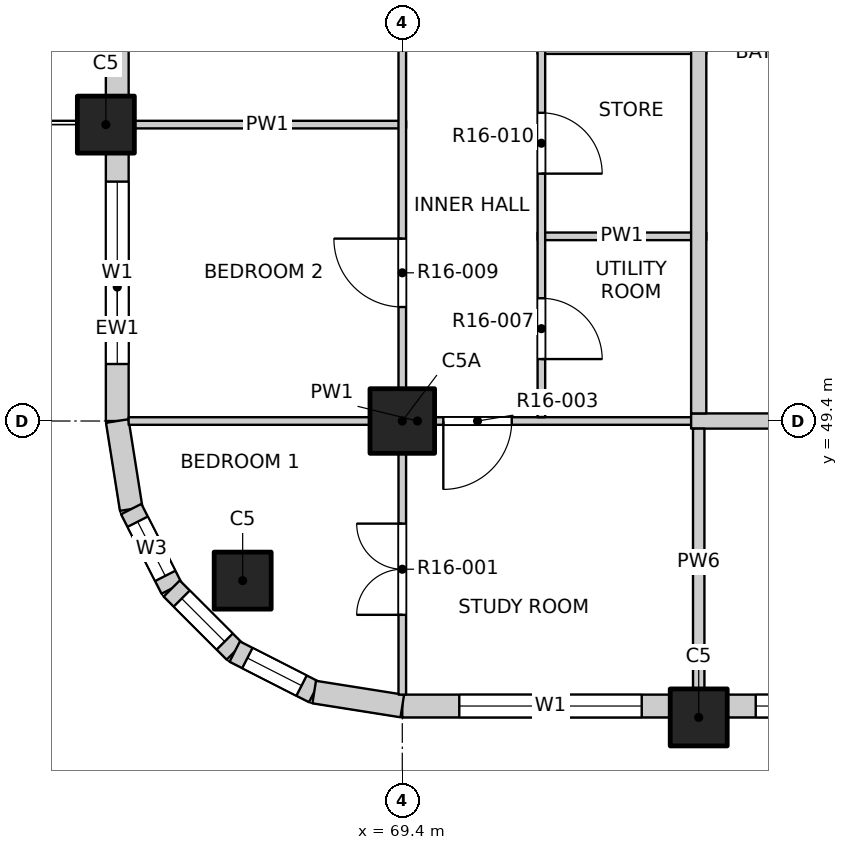
"""IFC4 building model, lengths in metres.
Left out: names, types, materials, properties, quantities, classifications, styles, units other than length and angle.
Written with IfcOpenShell. Run it as: python <this file> out.ifc"""

import sys

from ifc_helpers import new_model, si_unit, direction, frame, frame_2d, origin, origin_2d, place, context, subcontext, project, spatial, rectangle, extrude, element, fill, save


model = new_model("IFC4")
c1 = context("Model", 3, precision=1e-05, world=origin(), true_north=direction((0.0, 1.0)))
c2 = subcontext(c1, "Body", "Model", "MODEL_VIEW")
j1 = project(units=[si_unit("LENGTHUNIT", "METRE"), si_unit("PLANEANGLEUNIT", "RADIAN")], contexts=[c1])
p1 = place(None, origin())
s1 = spatial("IfcSite", under=j1, at=p1, CompositionType="ELEMENT")
p2 = place(p1, origin())
s2 = spatial("IfcBuilding", under=s1, at=p2, CompositionType="ELEMENT")
p3 = place(p2, frame((0.0, 0.0, 169.0)))
s3 = spatial("IfcBuildingStorey", under=s2, at=p3, CompositionType="ELEMENT", Elevation=169.0)
for number, where, z_axis, x_axis in (
    (1, (67.3, 47.3, -0.25), (0.0, 0.0, 1.0), (1.0, 0.0, 0.0)),
    (2, (65.5, 53.3, -0.25), (0.0, 0.0, 1.0), (1.0, 0.0, 0.0)),
    (3, (73.3, 45.5, -0.25), (0.0, 0.0, 1.0), (1.0, 0.0, 0.0)),
):
    element("IfcColumn", number, at=place(p3, frame(where, z_axis=z_axis, x_axis=x_axis)), inside=s3, PredefinedType="COLUMN", context=c2, shape_type="SweptSolid", body=[
        extrude(rectangle(XDim=0.75, YDim=0.75, at=origin_2d()), origin(), (0.0, 0.0, 1.0), 3.35),
    ])
p4 = place(p3, frame((69.4, 49.4, -0.25), z_axis=(0.0, 0.0, 1.0), x_axis=(1.0, 0.0, 0.0)))
e4 = element("IfcColumn", 4, at=p4, inside=s3, PredefinedType="COLUMN", context=c2, shape_type="SweptSolid", body=[
    extrude(rectangle(XDim=0.85, YDim=0.85, at=origin_2d()), origin(), (0.0, 0.0, 1.0), 3.35),
])
p5 = place(p3, frame((69.4, 45.65, 0.0), z_axis=(0.0, 0.0, 1.0), x_axis=(1.0, 0.0, 0.0)))
e5 = element("IfcWall", 5, at=p5, inside=s3, PredefinedType="SOLIDWALL", context=c2, shape_type="SweptSolid", body=[
    extrude(rectangle(XDim=3.525, YDim=0.3, at=frame_2d((1.763, 0.0))), origin(), (0.0, 0.0, 1.0), 3.1),
])
p6 = place(p5, frame((0.75, 0.0, 0.9)))
e6 = element("IfcOpeningElement", 6, at=p6, cuts=e5, PredefinedType="OPENING", context=c2, shape_type="SweptSolid", body=[
    extrude(rectangle(XDim=2.4, YDim=1.8, at=frame_2d((1.2, 0.9))), frame((0.0, 0.16, 0.0), z_axis=(0.0, -1.0, 0.0), x_axis=(1.0, 0.0, 0.0)), (0.0, 0.0, 1.0), 0.32),
])
p7 = place(p3, frame((73.675, 45.65, 0.0), z_axis=(0.0, 0.0, 1.0), x_axis=(1.0, 0.0, 0.0)))
e7 = element("IfcWall", 7, at=p7, inside=s3, PredefinedType="SOLIDWALL", context=c2, shape_type="SweptSolid", body=[
    extrude(rectangle(XDim=7.05, YDim=0.3, at=frame_2d((3.525, 0.0))), origin(), (0.0, 0.0, 1.0), 3.1),
])
p8 = place(p7, frame((0.375, 0.0, 0.9)))
e8 = element("IfcOpeningElement", 8, at=p8, cuts=e7, PredefinedType="OPENING", context=c2, shape_type="SweptSolid", body=[
    extrude(rectangle(XDim=2.4, YDim=1.8, at=frame_2d((1.2, 0.9))), frame((0.0, 0.16, 0.0), z_axis=(0.0, -1.0, 0.0), x_axis=(1.0, 0.0, 0.0)), (0.0, 0.0, 1.0), 0.32),
])
p9 = place(p7, frame((4.275, 0.0, 0.9)))
e9 = element("IfcOpeningElement", 9, at=p9, cuts=e7, PredefinedType="OPENING", context=c2, shape_type="SweptSolid", body=[
    extrude(rectangle(XDim=2.4, YDim=1.8, at=frame_2d((1.2, 0.9))), frame((0.0, 0.16, 0.0), z_axis=(0.0, -1.0, 0.0), x_axis=(1.0, 0.0, 0.0)), (0.0, 0.0, 1.0), 0.32),
])
p10 = place(p3, frame((65.65, 49.4, 0.0), z_axis=(0.0, 0.0, 1.0), x_axis=(0.0, 1.0, 0.0)))
e10 = element("IfcWall", 10, at=p10, inside=s3, PredefinedType="SOLIDWALL", context=c2, shape_type="SweptSolid", body=[
    extrude(rectangle(XDim=3.525, YDim=0.3, at=frame_2d((1.763, 0.0))), origin(), (0.0, 0.0, 1.0), 3.1),
])
p11 = place(p10, frame((0.75, 0.0, 0.9)))
e11 = element("IfcOpeningElement", 11, at=p11, cuts=e10, PredefinedType="OPENING", context=c2, shape_type="SweptSolid", body=[
    extrude(rectangle(XDim=2.4, YDim=1.8, at=frame_2d((1.2, 0.9))), frame((0.0, 0.16, 0.0), z_axis=(0.0, -1.0, 0.0), x_axis=(1.0, 0.0, 0.0)), (0.0, 0.0, 1.0), 0.32),
])
p12 = place(p3, frame((65.65, 53.675, 0.0), z_axis=(0.0, 0.0, 1.0), x_axis=(0.0, 1.0, 0.0)))
e12 = element("IfcWall", 12, at=p12, inside=s3, PredefinedType="SOLIDWALL", context=c2, shape_type="SweptSolid", body=[
    extrude(rectangle(XDim=7.05, YDim=0.3, at=frame_2d((3.525, 0.0))), origin(), (0.0, 0.0, 1.0), 3.1),
])
p13 = place(p12, frame((0.675, 0.0, 0.0)))
e13 = element("IfcOpeningElement", 13, at=p13, cuts=e12, PredefinedType="OPENING", context=c2, shape_type="SweptSolid", body=[
    extrude(rectangle(XDim=1.8, YDim=2.4, at=frame_2d((0.9, 1.2))), frame((0.0, 0.16, 0.0), z_axis=(0.0, -1.0, 0.0), x_axis=(1.0, 0.0, 0.0)), (0.0, 0.0, 1.0), 0.32),
])
p14 = place(p12, frame((4.275, 0.0, 0.9)))
e14 = element("IfcOpeningElement", 14, at=p14, cuts=e12, PredefinedType="OPENING", context=c2, shape_type="SweptSolid", body=[
    extrude(rectangle(XDim=2.4, YDim=1.8, at=frame_2d((1.2, 0.9))), frame((0.0, 0.16, 0.0), z_axis=(0.0, -1.0, 0.0), x_axis=(1.0, 0.0, 0.0)), (0.0, 0.0, 1.0), 0.32),
])
p15 = place(p3, frame((65.65, 49.4, 0.0), z_axis=(0.0, 0.0, 1.0), x_axis=(0.156496880861, -0.987678452879, 0.0)))
e15 = element("IfcWall", 15, at=p15, inside=s3, PredefinedType="SOLIDWALL", context=c2, shape_type="SweptSolid", body=[
    extrude(rectangle(XDim=1.173, YDim=0.3, at=frame_2d((0.586, 0.0))), origin(), (0.0, 0.0, 1.0), 3.1),
])
p16 = place(p3, frame((65.833, 48.241, 0.0), z_axis=(0.0, 0.0, 1.0), x_axis=(0.454025524128, -0.890988677504, 0.0)))
e16 = element("IfcWall", 16, at=p16, inside=s3, PredefinedType="SOLIDWALL", context=c2, shape_type="SweptSolid", body=[
    extrude(rectangle(XDim=1.173, YDim=0.3, at=frame_2d((0.587, 0.0))), origin(), (0.0, 0.0, 1.0), 3.1),
])
p17 = place(p16, frame((0.187, 0.0, 0.9)))
e17 = element("IfcOpeningElement", 17, at=p17, cuts=e16, PredefinedType="OPENING", context=c2, shape_type="SweptSolid", body=[
    extrude(rectangle(XDim=0.8, YDim=1.2, at=frame_2d((0.4, 0.6))), frame((0.0, 0.16, 0.0), z_axis=(0.0, -1.0, 0.0), x_axis=(1.0, 0.0, 0.0)), (0.0, 0.0, 1.0), 0.32),
])
p18 = place(p3, frame((66.366, 47.196, 0.0), z_axis=(0.0, 0.0, 1.0), x_axis=(0.707106781187, -0.707106781187, 0.0)))
e18 = element("IfcWall", 18, at=p18, inside=s3, PredefinedType="SOLIDWALL", context=c2, shape_type="SweptSolid", body=[
    extrude(rectangle(XDim=1.173, YDim=0.3, at=frame_2d((0.586, 0.0))), origin(), (0.0, 0.0, 1.0), 3.1),
])
p19 = place(p18, frame((0.187, 0.0, 0.9)))
e19 = element("IfcOpeningElement", 19, at=p19, cuts=e18, PredefinedType="OPENING", context=c2, shape_type="SweptSolid", body=[
    extrude(rectangle(XDim=0.8, YDim=1.2, at=frame_2d((0.4, 0.6))), frame((0.0, 0.16, 0.0), z_axis=(0.0, -1.0, 0.0), x_axis=(1.0, 0.0, 0.0)), (0.0, 0.0, 1.0), 0.32),
])
p20 = place(p3, frame((67.196, 46.366, 0.0), z_axis=(0.0, 0.0, 1.0), x_axis=(0.890988677504, -0.454025524128, 0.0)))
e20 = element("IfcWall", 20, at=p20, inside=s3, PredefinedType="SOLIDWALL", context=c2, shape_type="SweptSolid", body=[
    extrude(rectangle(XDim=1.173, YDim=0.3, at=frame_2d((0.587, 0.0))), origin(), (0.0, 0.0, 1.0), 3.1),
])
p21 = place(p20, frame((0.187, 0.0, 0.9)))
e21 = element("IfcOpeningElement", 21, at=p21, cuts=e20, PredefinedType="OPENING", context=c2, shape_type="SweptSolid", body=[
    extrude(rectangle(XDim=0.8, YDim=1.2, at=frame_2d((0.4, 0.6))), frame((0.0, 0.16, 0.0), z_axis=(0.0, -1.0, 0.0), x_axis=(1.0, 0.0, 0.0)), (0.0, 0.0, 1.0), 0.32),
])
p22 = place(p3, frame((68.241, 45.833, 0.0), z_axis=(0.0, 0.0, 1.0), x_axis=(0.987678452879, -0.156496880861, 0.0)))
e22 = element("IfcWall", 22, at=p22, inside=s3, PredefinedType="SOLIDWALL", context=c2, shape_type="SweptSolid", body=[
    extrude(rectangle(XDim=1.173, YDim=0.3, at=frame_2d((0.586, 0.0))), origin(), (0.0, 0.0, 1.0), 3.1),
])
p23 = place(p3, frame((65.8, 49.4, 0.0), z_axis=(0.0, 0.0, 1.0), x_axis=(1.0, 0.0, 0.0)))
e23 = element("IfcWall", 23, at=p23, inside=s3, PredefinedType="PARTITIONING", context=c2, shape_type="SweptSolid", body=[
    extrude(rectangle(XDim=7.6, YDim=0.1, at=frame_2d((3.8, 0.0))), origin(), (0.0, 0.0, 1.0), 3.1),
])
p24 = place(p23, frame((4.14, 0.0, 0.0)))
e24 = element("IfcOpeningElement", 24, at=p24, cuts=e23, PredefinedType="OPENING", context=c2, shape_type="SweptSolid", body=[
    extrude(rectangle(XDim=0.9, YDim=2.1, at=frame_2d((0.45, 1.05))), frame((0.0, 0.06, 0.0), z_axis=(0.0, -1.0, 0.0), x_axis=(1.0, 0.0, 0.0)), (0.0, 0.0, 1.0), 0.12),
])
p25 = place(p3, frame((73.2, 49.4, 0.0), z_axis=(0.0, 0.0, 1.0), x_axis=(1.0, 0.0, 0.0)))
e25 = element("IfcWall", 25, at=p25, inside=s3, PredefinedType="PARTITIONING", context=c2, shape_type="SweptSolid", body=[
    extrude(rectangle(XDim=23.6, YDim=0.2, at=frame_2d((11.8, 0.0))), origin(), (0.0, 0.0, 1.0), 3.1),
])
p26 = place(p25, frame((7.3, 0.0, 0.0)))
e26 = element("IfcOpeningElement", 26, at=p26, cuts=e25, PredefinedType="OPENING", context=c2, shape_type="SweptSolid", body=[
    extrude(rectangle(XDim=1.2, YDim=2.1, at=frame_2d((0.6, 1.05))), frame((0.0, 0.11, 0.0), z_axis=(0.0, -1.0, 0.0), x_axis=(1.0, 0.0, 0.0)), (0.0, 0.0, 1.0), 0.22),
])
p27 = place(p25, frame((20.125, 0.0, 0.0)))
e27 = element("IfcOpeningElement", 27, at=p27, cuts=e25, PredefinedType="OPENING", context=c2, shape_type="SweptSolid", body=[
    extrude(rectangle(XDim=1.2, YDim=2.1, at=frame_2d((0.6, 1.05))), frame((0.0, 0.11, 0.0), z_axis=(0.0, -1.0, 0.0), x_axis=(1.0, 0.0, 0.0)), (0.0, 0.0, 1.0), 0.22),
])
p28 = place(p3, frame((71.18, 51.83, 0.0), z_axis=(0.0, 0.0, 1.0), x_axis=(1.0, 0.0, 0.0)))
e28 = element("IfcWall", 28, at=p28, inside=s3, PredefinedType="PARTITIONING", context=c2, shape_type="SweptSolid", body=[
    extrude(rectangle(XDim=2.22, YDim=0.1, at=frame_2d((1.11, 0.0))), origin(), (0.0, 0.0, 1.0), 3.1),
])
p29 = place(p3, frame((65.8, 53.3, 0.0), z_axis=(0.0, 0.0, 1.0), x_axis=(1.0, 0.0, 0.0)))
e29 = element("IfcWall", 29, at=p29, inside=s3, PredefinedType="PARTITIONING", context=c2, shape_type="SweptSolid", body=[
    extrude(rectangle(XDim=3.65, YDim=0.1, at=frame_2d((1.825, 0.0))), origin(), (0.0, 0.0, 1.0), 3.1),
])
p30 = place(p3, frame((71.18, 54.28, 0.0), z_axis=(0.0, 0.0, 1.0), x_axis=(1.0, 0.0, 0.0)))
e30 = element("IfcWall", 30, at=p30, inside=s3, PredefinedType="PARTITIONING", context=c2, shape_type="SweptSolid", body=[
    extrude(rectangle(XDim=2.22, YDim=0.1, at=frame_2d((1.11, 0.0))), origin(), (0.0, 0.0, 1.0), 3.1),
])
p31 = place(p3, frame((69.4, 45.8, 0.0), z_axis=(0.0, 0.0, 1.0), x_axis=(0.0, 1.0, 0.0)))
e31 = element("IfcWall", 31, at=p31, inside=s3, PredefinedType="PARTITIONING", context=c2, shape_type="SweptSolid", body=[
    extrude(rectangle(XDim=38.4, YDim=0.1, at=frame_2d((19.2, 0.0))), origin(), (0.0, 0.0, 1.0), 3.1),
])
p32 = place(p31, frame((1.05, 0.0, 0.0)))
e32 = element("IfcOpeningElement", 32, at=p32, cuts=e31, PredefinedType="OPENING", context=c2, shape_type="SweptSolid", body=[
    extrude(rectangle(XDim=1.2, YDim=2.1, at=frame_2d((0.6, 1.05))), frame((0.0, 0.06, 0.0), z_axis=(0.0, -1.0, 0.0), x_axis=(1.0, 0.0, 0.0)), (0.0, 0.0, 1.0), 0.12),
])
p33 = place(p31, frame((5.1, 0.0, 0.0)))
e33 = element("IfcOpeningElement", 33, at=p33, cuts=e31, PredefinedType="OPENING", context=c2, shape_type="SweptSolid", body=[
    extrude(rectangle(XDim=0.9, YDim=2.1, at=frame_2d((0.45, 1.05))), frame((0.0, 0.06, 0.0), z_axis=(0.0, -1.0, 0.0), x_axis=(1.0, 0.0, 0.0)), (0.0, 0.0, 1.0), 0.12),
])
p34 = place(p31, frame((9.0, 0.0, 0.0)))
e34 = element("IfcOpeningElement", 34, at=p34, cuts=e31, PredefinedType="OPENING", context=c2, shape_type="SweptSolid", body=[
    extrude(rectangle(XDim=0.9, YDim=2.1, at=frame_2d((0.45, 1.05))), frame((0.0, 0.06, 0.0), z_axis=(0.0, -1.0, 0.0), x_axis=(1.0, 0.0, 0.0)), (0.0, 0.0, 1.0), 0.12),
])
p35 = place(p31, frame((12.9, 0.0, 0.0)))
e35 = element("IfcOpeningElement", 35, at=p35, cuts=e31, PredefinedType="OPENING", context=c2, shape_type="SweptSolid", body=[
    extrude(rectangle(XDim=0.9, YDim=2.1, at=frame_2d((0.45, 1.05))), frame((0.0, 0.06, 0.0), z_axis=(0.0, -1.0, 0.0), x_axis=(1.0, 0.0, 0.0)), (0.0, 0.0, 1.0), 0.12),
])
p36 = place(p31, frame((16.8, 0.0, 0.0)))
e36 = element("IfcOpeningElement", 36, at=p36, cuts=e31, PredefinedType="OPENING", context=c2, shape_type="SweptSolid", body=[
    extrude(rectangle(XDim=0.9, YDim=2.1, at=frame_2d((0.45, 1.05))), frame((0.0, 0.06, 0.0), z_axis=(0.0, -1.0, 0.0), x_axis=(1.0, 0.0, 0.0)), (0.0, 0.0, 1.0), 0.12),
])
p37 = place(p31, frame((20.7, 0.0, 0.0)))
e37 = element("IfcOpeningElement", 37, at=p37, cuts=e31, PredefinedType="OPENING", context=c2, shape_type="SweptSolid", body=[
    extrude(rectangle(XDim=0.9, YDim=2.1, at=frame_2d((0.45, 1.05))), frame((0.0, 0.06, 0.0), z_axis=(0.0, -1.0, 0.0), x_axis=(1.0, 0.0, 0.0)), (0.0, 0.0, 1.0), 0.12),
])
p38 = place(p31, frame((24.6, 0.0, 0.0)))
e38 = element("IfcOpeningElement", 38, at=p38, cuts=e31, PredefinedType="OPENING", context=c2, shape_type="SweptSolid", body=[
    extrude(rectangle(XDim=0.9, YDim=2.1, at=frame_2d((0.45, 1.05))), frame((0.0, 0.06, 0.0), z_axis=(0.0, -1.0, 0.0), x_axis=(1.0, 0.0, 0.0)), (0.0, 0.0, 1.0), 0.12),
])
p39 = place(p31, frame((28.5, 0.0, 0.0)))
e39 = element("IfcOpeningElement", 39, at=p39, cuts=e31, PredefinedType="OPENING", context=c2, shape_type="SweptSolid", body=[
    extrude(rectangle(XDim=0.9, YDim=2.1, at=frame_2d((0.45, 1.05))), frame((0.0, 0.06, 0.0), z_axis=(0.0, -1.0, 0.0), x_axis=(1.0, 0.0, 0.0)), (0.0, 0.0, 1.0), 0.12),
])
p40 = place(p31, frame((32.4, 0.0, 0.0)))
e40 = element("IfcOpeningElement", 40, at=p40, cuts=e31, PredefinedType="OPENING", context=c2, shape_type="SweptSolid", body=[
    extrude(rectangle(XDim=0.9, YDim=2.1, at=frame_2d((0.45, 1.05))), frame((0.0, 0.06, 0.0), z_axis=(0.0, -1.0, 0.0), x_axis=(1.0, 0.0, 0.0)), (0.0, 0.0, 1.0), 0.12),
])
p41 = place(p31, frame((36.15, 0.0, 0.0)))
e41 = element("IfcOpeningElement", 41, at=p41, cuts=e31, PredefinedType="OPENING", context=c2, shape_type="SweptSolid", body=[
    extrude(rectangle(XDim=1.2, YDim=2.1, at=frame_2d((0.6, 1.05))), frame((0.0, 0.06, 0.0), z_axis=(0.0, -1.0, 0.0), x_axis=(1.0, 0.0, 0.0)), (0.0, 0.0, 1.0), 0.12),
])
p42 = place(p3, frame((71.23, 49.45, 0.0), z_axis=(0.0, 0.0, 1.0), x_axis=(0.0, 1.0, 0.0)))
e42 = element("IfcWall", 42, at=p42, inside=s3, PredefinedType="PARTITIONING", context=c2, shape_type="SweptSolid", body=[
    extrude(rectangle(XDim=13.0, YDim=0.1, at=frame_2d((6.5, 0.0))), origin(), (0.0, 0.0, 1.0), 3.1),
])
p43 = place(p42, frame((0.765, 0.0, 0.0)))
e43 = element("IfcOpeningElement", 43, at=p43, cuts=e42, PredefinedType="OPENING", context=c2, shape_type="SweptSolid", body=[
    extrude(rectangle(XDim=0.8, YDim=2.1, at=frame_2d((0.4, 1.05))), frame((0.0, 0.06, 0.0), z_axis=(0.0, -1.0, 0.0), x_axis=(1.0, 0.0, 0.0)), (0.0, 0.0, 1.0), 0.12),
])
p44 = place(p42, frame((3.205, 0.0, 0.0)))
e44 = element("IfcOpeningElement", 44, at=p44, cuts=e42, PredefinedType="OPENING", context=c2, shape_type="SweptSolid", body=[
    extrude(rectangle(XDim=0.8, YDim=2.1, at=frame_2d((0.4, 1.05))), frame((0.0, 0.06, 0.0), z_axis=(0.0, -1.0, 0.0), x_axis=(1.0, 0.0, 0.0)), (0.0, 0.0, 1.0), 0.12),
])
p45 = place(p42, frame((5.73, 0.0, 0.0)))
e45 = element("IfcOpeningElement", 45, at=p45, cuts=e42, PredefinedType="OPENING", context=c2, shape_type="SweptSolid", body=[
    extrude(rectangle(XDim=0.8, YDim=2.1, at=frame_2d((0.4, 1.05))), frame((0.0, 0.06, 0.0), z_axis=(0.0, -1.0, 0.0), x_axis=(1.0, 0.0, 0.0)), (0.0, 0.0, 1.0), 0.12),
])
p46 = place(p42, frame((8.18, 0.0, 0.0)))
e46 = element("IfcOpeningElement", 46, at=p46, cuts=e42, PredefinedType="OPENING", context=c2, shape_type="SweptSolid", body=[
    extrude(rectangle(XDim=0.9, YDim=2.1, at=frame_2d((0.45, 1.05))), frame((0.0, 0.06, 0.0), z_axis=(0.0, -1.0, 0.0), x_axis=(1.0, 0.0, 0.0)), (0.0, 0.0, 1.0), 0.12),
])
p47 = place(p42, frame((10.99, 0.0, 0.0)))
e47 = element("IfcOpeningElement", 47, at=p47, cuts=e42, PredefinedType="OPENING", context=c2, shape_type="SweptSolid", body=[
    extrude(rectangle(XDim=0.9, YDim=2.1, at=frame_2d((0.45, 1.05))), frame((0.0, 0.06, 0.0), z_axis=(0.0, -1.0, 0.0), x_axis=(1.0, 0.0, 0.0)), (0.0, 0.0, 1.0), 0.12),
])
p48 = place(p3, frame((73.3, 45.8, 0.0), z_axis=(0.0, 0.0, 1.0), x_axis=(0.0, 1.0, 0.0)))
e48 = element("IfcWall", 48, at=p48, inside=s3, PredefinedType="PARTITIONING", context=c2, shape_type="SweptSolid", body=[
    extrude(rectangle(XDim=3.5, YDim=0.15, at=frame_2d((1.75, 0.0))), origin(), (0.0, 0.0, 1.0), 3.1),
])
p49 = place(p3, frame((73.3, 49.5, 0.0), z_axis=(0.0, 0.0, 1.0), x_axis=(0.0, 1.0, 0.0)))
e49 = element("IfcWall", 49, at=p49, inside=s3, PredefinedType="PARTITIONING", context=c2, shape_type="SweptSolid", body=[
    extrude(rectangle(XDim=34.7, YDim=0.2, at=frame_2d((17.35, 0.0))), origin(), (0.0, 0.0, 1.0), 3.1),
])
p50 = place(p49, frame((14.275, 0.0, 0.0)))
e50 = element("IfcOpeningElement", 50, at=p50, cuts=e49, PredefinedType="OPENING", context=c2, shape_type="SweptSolid", body=[
    extrude(rectangle(XDim=1.0, YDim=2.1, at=frame_2d((0.5, 1.05))), frame((0.0, 0.11, 0.0), z_axis=(0.0, -1.0, 0.0), x_axis=(1.0, 0.0, 0.0)), (0.0, 0.0, 1.0), 0.22),
])
p51 = place(p49, frame((21.925, 0.0, 0.0)))
e51 = element("IfcOpeningElement", 51, at=p51, cuts=e49, PredefinedType="OPENING", context=c2, shape_type="SweptSolid", body=[
    extrude(rectangle(XDim=1.0, YDim=2.1, at=frame_2d((0.5, 1.05))), frame((0.0, 0.11, 0.0), z_axis=(0.0, -1.0, 0.0), x_axis=(1.0, 0.0, 0.0)), (0.0, 0.0, 1.0), 0.22),
])
p52 = place(p49, frame((29.125, 0.0, 0.0)))
e52 = element("IfcOpeningElement", 52, at=p52, cuts=e49, PredefinedType="OPENING", context=c2, shape_type="SweptSolid", body=[
    extrude(rectangle(XDim=1.0, YDim=2.1, at=frame_2d((0.5, 1.05))), frame((0.0, 0.11, 0.0), z_axis=(0.0, -1.0, 0.0), x_axis=(1.0, 0.0, 0.0)), (0.0, 0.0, 1.0), 0.22),
])
p53 = place(p6, origin())
e53 = element("IfcWindow", 53, at=p53, inside=s3, PartitioningType="DOUBLE_PANEL_VERTICAL", PredefinedType="WINDOW", context=c2, shape_type="SweptSolid", body=[
    extrude(rectangle(XDim=2.4, YDim=1.8, at=frame_2d((1.2, 0.9))), frame((0.0, 0.03, 0.0), z_axis=(0.0, -1.0, 0.0), x_axis=(1.0, 0.0, 0.0)), (0.0, 0.0, 1.0), 0.06),
])
fill(e6, e53)
p54 = place(p8, origin())
e54 = element("IfcWindow", 54, at=p54, inside=s3, PartitioningType="DOUBLE_PANEL_VERTICAL", PredefinedType="WINDOW", context=c2, shape_type="SweptSolid", body=[
    extrude(rectangle(XDim=2.4, YDim=1.8, at=frame_2d((1.2, 0.9))), frame((0.0, 0.03, 0.0), z_axis=(0.0, -1.0, 0.0), x_axis=(1.0, 0.0, 0.0)), (0.0, 0.0, 1.0), 0.06),
])
fill(e8, e54)
p55 = place(p11, origin())
e55 = element("IfcWindow", 55, at=p55, inside=s3, PartitioningType="DOUBLE_PANEL_VERTICAL", PredefinedType="WINDOW", context=c2, shape_type="SweptSolid", body=[
    extrude(rectangle(XDim=2.4, YDim=1.8, at=frame_2d((1.2, 0.9))), frame((0.0, 0.03, 0.0), z_axis=(0.0, -1.0, 0.0), x_axis=(1.0, 0.0, 0.0)), (0.0, 0.0, 1.0), 0.06),
])
fill(e11, e55)
p56 = place(p17, origin())
e56 = element("IfcWindow", 56, at=p56, inside=s3, PartitioningType="SINGLE_PANEL", PredefinedType="WINDOW", context=c2, shape_type="SweptSolid", body=[
    extrude(rectangle(XDim=0.8, YDim=1.2, at=frame_2d((0.4, 0.6))), frame((0.0, 0.03, 0.0), z_axis=(0.0, -1.0, 0.0), x_axis=(1.0, 0.0, 0.0)), (0.0, 0.0, 1.0), 0.06),
])
fill(e17, e56)
p57 = place(p19, origin())
e57 = element("IfcWindow", 57, at=p57, inside=s3, PartitioningType="SINGLE_PANEL", PredefinedType="WINDOW", context=c2, shape_type="SweptSolid", body=[
    extrude(rectangle(XDim=0.8, YDim=1.2, at=frame_2d((0.4, 0.6))), frame((0.0, 0.03, 0.0), z_axis=(0.0, -1.0, 0.0), x_axis=(1.0, 0.0, 0.0)), (0.0, 0.0, 1.0), 0.06),
])
fill(e19, e57)
p58 = place(p21, origin())
e58 = element("IfcWindow", 58, at=p58, inside=s3, PartitioningType="SINGLE_PANEL", PredefinedType="WINDOW", context=c2, shape_type="SweptSolid", body=[
    extrude(rectangle(XDim=0.8, YDim=1.2, at=frame_2d((0.4, 0.6))), frame((0.0, 0.03, 0.0), z_axis=(0.0, -1.0, 0.0), x_axis=(1.0, 0.0, 0.0)), (0.0, 0.0, 1.0), 0.06),
])
fill(e21, e58)
p59 = place(p32, origin())
e59 = element("IfcDoor", 59, at=p59, inside=s3, OperationType="DOUBLE_DOOR_SINGLE_SWING", PredefinedType="DOOR", context=c2, shape_type="SweptSolid", body=[
    extrude(rectangle(XDim=1.2, YDim=2.1, at=frame_2d((0.6, 1.05))), frame((0.0, 0.025, 0.0), z_axis=(0.0, -1.0, 0.0), x_axis=(1.0, 0.0, 0.0)), (0.0, 0.0, 1.0), 0.05),
])
fill(e32, e59)
p60 = place(p24, origin())
e60 = element("IfcDoor", 60, at=p60, inside=s3, OperationType="SINGLE_SWING_RIGHT", PredefinedType="DOOR", context=c2, shape_type="SweptSolid", body=[
    extrude(rectangle(XDim=0.9, YDim=2.1, at=frame_2d((0.45, 1.05))), frame((0.0, 0.025, 0.0), z_axis=(0.0, -1.0, 0.0), x_axis=(1.0, 0.0, 0.0)), (0.0, 0.0, 1.0), 0.05),
])
fill(e24, e60)
p61 = place(p43, origin())
e61 = element("IfcDoor", 61, at=p61, inside=s3, OperationType="SINGLE_SWING_RIGHT", PredefinedType="DOOR", context=c2, shape_type="SweptSolid", body=[
    extrude(rectangle(XDim=0.8, YDim=2.1, at=frame_2d((0.4, 1.05))), frame((0.0, 0.025, 0.0), z_axis=(0.0, -1.0, 0.0), x_axis=(1.0, 0.0, 0.0)), (0.0, 0.0, 1.0), 0.05),
])
fill(e43, e61)
p62 = place(p33, origin())
e62 = element("IfcDoor", 62, at=p62, inside=s3, OperationType="SINGLE_SWING_RIGHT", PredefinedType="DOOR", context=c2, shape_type="SweptSolid", body=[
    extrude(rectangle(XDim=0.9, YDim=2.1, at=frame_2d((0.45, 1.05))), frame((0.0, 0.025, 0.0), z_axis=(0.0, -1.0, 0.0), x_axis=(1.0, 0.0, 0.0)), (0.0, 0.0, 1.0), 0.05),
])
fill(e33, e62)
p63 = place(p44, origin())
e63 = element("IfcDoor", 63, at=p63, inside=s3, OperationType="SINGLE_SWING_RIGHT", PredefinedType="DOOR", context=c2, shape_type="SweptSolid", body=[
    extrude(rectangle(XDim=0.8, YDim=2.1, at=frame_2d((0.4, 1.05))), frame((0.0, 0.025, 0.0), z_axis=(0.0, -1.0, 0.0), x_axis=(1.0, 0.0, 0.0)), (0.0, 0.0, 1.0), 0.05),
])
fill(e44, e63)
save(model, sys.argv[1])
